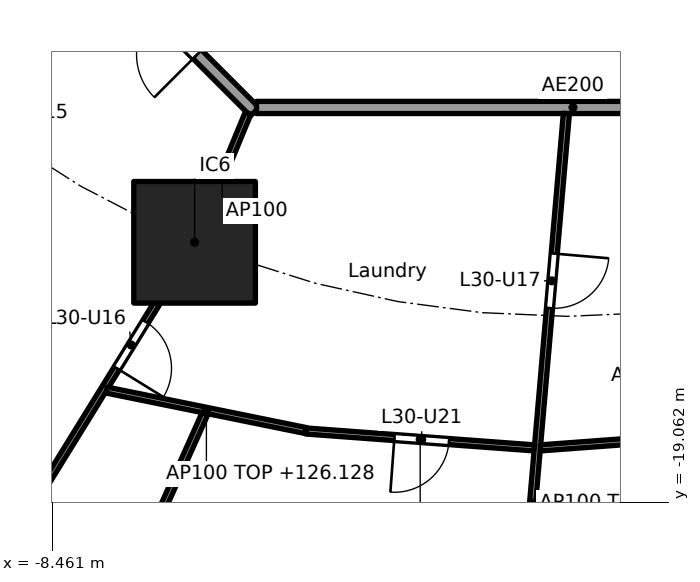
"""IFC4 building model, lengths in metres.
Left out: names, types, materials, properties, quantities, classifications, styles, units other than length and angle.
Written with IfcOpenShell. Run it as: python <this file> out.ifc"""

import sys

from ifc_helpers import new_model, si_unit, direction, frame, frame_2d, origin, origin_2d, place, context, subcontext, project, spatial, rectangle, extrude, element, fill, save


model = new_model("IFC4")
c1 = context("Model", 3, precision=1e-05, world=origin(), true_north=direction((0.0, 1.0)))
c2 = subcontext(c1, "Body", "Model", "MODEL_VIEW")
j1 = project(units=[si_unit("LENGTHUNIT", "METRE"), si_unit("PLANEANGLEUNIT", "RADIAN")], contexts=[c1])
p1 = place(None, origin())
s1 = spatial("IfcSite", under=j1, at=p1, CompositionType="ELEMENT")
p2 = place(p1, origin())
s2 = spatial("IfcBuilding", under=s1, at=p2, CompositionType="ELEMENT")
p3 = place(p2, frame((0.0, 0.0, 123.3)))
s3 = spatial("IfcBuildingStorey", under=s2, at=p3, CompositionType="ELEMENT", Elevation=123.3)
p4 = place(p3, frame((-6.123, -14.782, 0.0), z_axis=(0.0, 0.0, 1.0), x_axis=(1.0, 0.0, 0.0)))
e1 = element("IfcColumn", 1, at=p4, inside=s3, PredefinedType="COLUMN", context=c2, shape_type="SweptSolid", body=[
    extrude(rectangle(XDim=2.0, YDim=2.0, at=origin_2d()), origin(), (0.0, 0.0, 1.0), 3.7),
])
p5 = place(p3, frame((-12.635, -5.134, 0.0), z_axis=(0.0, 0.0, 1.0), x_axis=(0.707106781187, -0.707106781187, 0.0)))
e2 = element("IfcWall", 2, at=p5, inside=s3, PredefinedType="PARTITIONING", context=c2, shape_type="SweptSolid", body=[
    extrude(rectangle(XDim=10.609, YDim=0.2, at=frame_2d((5.305, 0.0))), origin(), (0.0, 0.0, 1.0), 3.44),
])
p6 = place(p5, frame((8.274, 0.0, 0.0)))
e3 = element("IfcOpeningElement", 3, at=p6, cuts=e2, PredefinedType="OPENING", context=c2, shape_type="SweptSolid", body=[
    extrude(rectangle(XDim=1.0, YDim=2.1, at=frame_2d((0.5, 1.05))), frame((0.0, 0.11, 0.0), z_axis=(0.0, -1.0, 0.0), x_axis=(1.0, 0.0, 0.0)), (0.0, 0.0, 1.0), 0.22),
])
p7 = place(p3, frame((-5.104, -12.565, 0.0), z_axis=(0.0, 0.0, 1.0), x_axis=(1.0, 0.0, 0.0)))
e4 = element("IfcWall", 4, at=p7, inside=s3, PredefinedType="PARTITIONING", context=c2, shape_type="SweptSolid", body=[
    extrude(rectangle(XDim=10.409, YDim=0.2, at=frame_2d((5.205, 0.0))), origin(), (0.0, 0.0, 1.0), 3.44),
])
p8 = place(p3, frame((-7.725, -10.186, 0.0), z_axis=(0.0, 0.0, 1.0), x_axis=(-0.668498346565, -0.743713628112, 0.0)))
e5 = element("IfcWall", 5, at=p8, inside=s3, PredefinedType="PARTITIONING", context=c2, shape_type="SweptSolid", body=[
    extrude(rectangle(XDim=11.919, YDim=0.1, at=frame_2d((5.959, 0.0))), origin(), (0.0, 0.0, 1.0), 2.756),
])
p9 = place(p8, frame((2.106, 0.0, 0.0)))
e6 = element("IfcOpeningElement", 6, at=p9, cuts=e5, PredefinedType="OPENING", context=c2, shape_type="SweptSolid", body=[
    extrude(rectangle(XDim=0.9, YDim=2.1, at=frame_2d((0.45, 1.05))), frame((0.0, 0.06, 0.0), z_axis=(0.0, -1.0, 0.0), x_axis=(1.0, 0.0, 0.0)), (0.0, 0.0, 1.0), 0.12),
])
p10 = place(p8, frame((8.041, 0.0, 0.0)))
e7 = element("IfcOpeningElement", 7, at=p10, cuts=e5, PredefinedType="OPENING", context=c2, shape_type="SweptSolid", body=[
    extrude(rectangle(XDim=0.9, YDim=2.1, at=frame_2d((0.45, 1.05))), frame((0.0, 0.06, 0.0), z_axis=(0.0, -1.0, 0.0), x_axis=(1.0, 0.0, 0.0)), (0.0, 0.0, 1.0), 0.12),
])
p11 = place(p3, frame((-5.243, -12.657, 0.0), z_axis=(0.0, 0.0, 1.0), x_axis=(-0.382811769845, -0.923826362943, 0.0)))
e8 = element("IfcWall", 8, at=p11, inside=s3, PredefinedType="PARTITIONING", context=c2, shape_type="SweptSolid", body=[
    extrude(rectangle(XDim=2.25, YDim=0.1, at=frame_2d((1.125, 0.0))), origin(), (0.0, 0.0, 1.0), 3.44),
])
p12 = place(p3, frame((-6.149, -14.825, 0.0), z_axis=(0.0, 0.0, 1.0), x_axis=(-0.525396393596, -0.850857584791, 0.0)))
e9 = element("IfcWall", 9, at=p12, inside=s3, PredefinedType="PARTITIONING", context=c2, shape_type="SweptSolid", body=[
    extrude(rectangle(XDim=9.643, YDim=0.1, at=frame_2d((4.822, 0.0))), origin(), (0.0, 0.0, 1.0), 3.44),
])
p13 = place(p12, frame((1.485, 0.0, 0.0)))
e10 = element("IfcOpeningElement", 10, at=p13, cuts=e9, PredefinedType="OPENING", context=c2, shape_type="SweptSolid", body=[
    extrude(rectangle(XDim=0.9, YDim=2.1, at=frame_2d((0.45, 1.05))), frame((0.0, 0.06, 0.0), z_axis=(0.0, -1.0, 0.0), x_axis=(1.0, 0.0, 0.0)), (0.0, 0.0, 1.0), 0.12),
])
p14 = place(p12, frame((5.744, 0.0, 0.0)))
e11 = element("IfcOpeningElement", 11, at=p14, cuts=e9, PredefinedType="OPENING", context=c2, shape_type="SweptSolid", body=[
    extrude(rectangle(XDim=0.9, YDim=2.1, at=frame_2d((0.45, 1.05))), frame((0.0, 0.06, 0.0), z_axis=(0.0, -1.0, 0.0), x_axis=(1.0, 0.0, 0.0)), (0.0, 0.0, 1.0), 0.12),
])
p15 = place(p3, frame((-7.568, -17.212, 0.0), z_axis=(0.0, 0.0, 1.0), x_axis=(0.979967079473, -0.199159541946, 0.0)))
e12 = element("IfcWall", 12, at=p15, inside=s3, PredefinedType="PARTITIONING", context=c2, shape_type="SweptSolid", body=[
    extrude(rectangle(XDim=3.347, YDim=0.1, at=frame_2d((1.673, 0.0))), origin(), (0.0, 0.0, 1.0), 2.828),
])
p16 = place(p3, frame((-5.949, -17.591, 0.0), z_axis=(0.0, 0.0, 1.0), x_axis=(-0.40838467696, -0.912809923053, 0.0)))
e13 = element("IfcWall", 13, at=p16, inside=s3, PredefinedType="PARTITIONING", context=c2, shape_type="SweptSolid", body=[
    extrude(rectangle(XDim=14.665, YDim=0.1, at=frame_2d((7.333, 0.0))), origin(), (0.0, 0.0, 1.0), 2.905),
])
p17 = place(p16, frame((10.334, 0.0, 0.0)))
e14 = element("IfcOpeningElement", 14, at=p17, cuts=e13, PredefinedType="OPENING", context=c2, shape_type="SweptSolid", body=[
    extrude(rectangle(XDim=0.9, YDim=2.1, at=frame_2d((0.45, 1.05))), frame((0.0, 0.06, 0.0), z_axis=(0.0, -1.0, 0.0), x_axis=(1.0, 0.0, 0.0)), (0.0, 0.0, 1.0), 0.12),
])
p18 = place(p3, frame((-4.29, -17.885, 0.0), z_axis=(0.0, 0.0, 1.0), x_axis=(0.997272353708, -0.073809569363, 0.0)))
e15 = element("IfcWall", 15, at=p18, inside=s3, PredefinedType="PARTITIONING", context=c2, shape_type="SweptSolid", body=[
    extrude(rectangle(XDim=3.764, YDim=0.1, at=frame_2d((1.882, 0.0))), origin(), (0.0, 0.0, 1.0), 2.828),
])
p19 = place(p18, frame((1.457, 0.0, 0.0)))
e16 = element("IfcOpeningElement", 16, at=p19, cuts=e15, PredefinedType="OPENING", context=c2, shape_type="SweptSolid", body=[
    extrude(rectangle(XDim=0.9, YDim=2.1, at=frame_2d((0.45, 1.05))), frame((0.0, 0.06, 0.0), z_axis=(0.0, -1.0, 0.0), x_axis=(1.0, 0.0, 0.0)), (0.0, 0.0, 1.0), 0.12),
])
p20 = place(p3, frame((-0.009, -12.664, 0.0), z_axis=(0.0, 0.0, 1.0), x_axis=(-0.086441225464, -0.996256952066, 0.0)))
e17 = element("IfcWall", 17, at=p20, inside=s3, PredefinedType="PARTITIONING", context=c2, shape_type="SweptSolid", body=[
    extrude(rectangle(XDim=12.862, YDim=0.1, at=frame_2d((6.431, 0.0))), origin(), (0.0, 0.0, 1.0), 2.756),
])
p21 = place(p20, frame((2.312, 0.0, 0.0)))
e18 = element("IfcOpeningElement", 18, at=p21, cuts=e17, PredefinedType="OPENING", context=c2, shape_type="SweptSolid", body=[
    extrude(rectangle(XDim=0.9, YDim=2.1, at=frame_2d((0.45, 1.05))), frame((0.0, 0.06, 0.0), z_axis=(0.0, -1.0, 0.0), x_axis=(1.0, 0.0, 0.0)), (0.0, 0.0, 1.0), 0.12),
])
p22 = place(p20, frame((8.718, 0.0, 0.0)))
e19 = element("IfcOpeningElement", 19, at=p22, cuts=e17, PredefinedType="OPENING", context=c2, shape_type="SweptSolid", body=[
    extrude(rectangle(XDim=0.9, YDim=2.1, at=frame_2d((0.45, 1.05))), frame((0.0, 0.06, 0.0), z_axis=(0.0, -1.0, 0.0), x_axis=(1.0, 0.0, 0.0)), (0.0, 0.0, 1.0), 0.12),
])
p23 = place(p3, frame((-0.436, -18.163, 0.0), z_axis=(0.0, 0.0, 1.0), x_axis=(0.997271025958, 0.073827506966, 0.0)))
e20 = element("IfcWall", 20, at=p23, inside=s3, PredefinedType="PARTITIONING", context=c2, shape_type="SweptSolid", body=[
    extrude(rectangle(XDim=3.664, YDim=0.1, at=frame_2d((1.832, 0.0))), origin(), (0.0, 0.0, 1.0), 2.828),
])
p24 = place(p6, frame((1.0, 0.0, 0.0), x_axis=(-1.0, 0.0, 0.0)))
e21 = element("IfcDoor", 21, at=p24, inside=s3, OperationType="SINGLE_SWING_LEFT", PredefinedType="DOOR", context=c2, shape_type="SweptSolid", body=[
    extrude(rectangle(XDim=1.0, YDim=2.1, at=frame_2d((0.5, 1.05))), frame((0.0, 0.025, 0.0), z_axis=(0.0, -1.0, 0.0), x_axis=(1.0, 0.0, 0.0)), (0.0, 0.0, 1.0), 0.05),
])
fill(e3, e21)
p25 = place(p13, origin())
e22 = element("IfcDoor", 22, at=p25, inside=s3, OperationType="SINGLE_SWING_RIGHT", PredefinedType="DOOR", context=c2, shape_type="SweptSolid", body=[
    extrude(rectangle(XDim=0.9, YDim=2.1, at=frame_2d((0.45, 1.05))), frame((0.0, 0.025, 0.0), z_axis=(0.0, -1.0, 0.0), x_axis=(1.0, 0.0, 0.0)), (0.0, 0.0, 1.0), 0.05),
])
fill(e10, e22)
p26 = place(p21, origin())
e23 = element("IfcDoor", 23, at=p26, inside=s3, OperationType="SINGLE_SWING_LEFT", PredefinedType="DOOR", context=c2, shape_type="SweptSolid", body=[
    extrude(rectangle(XDim=0.9, YDim=2.1, at=frame_2d((0.45, 1.05))), frame((0.0, 0.025, 0.0), z_axis=(0.0, -1.0, 0.0), x_axis=(1.0, 0.0, 0.0)), (0.0, 0.0, 1.0), 0.05),
])
fill(e18, e23)
p27 = place(p19, frame((0.9, 0.0, 0.0), x_axis=(-1.0, 0.0, 0.0)))
e24 = element("IfcDoor", 24, at=p27, inside=s3, OperationType="SINGLE_SWING_RIGHT", PredefinedType="DOOR", context=c2, shape_type="SweptSolid", body=[
    extrude(rectangle(XDim=0.9, YDim=2.1, at=frame_2d((0.45, 1.05))), frame((0.0, 0.025, 0.0), z_axis=(0.0, -1.0, 0.0), x_axis=(1.0, 0.0, 0.0)), (0.0, 0.0, 1.0), 0.05),
])
fill(e16, e24)
save(model, sys.argv[1])
